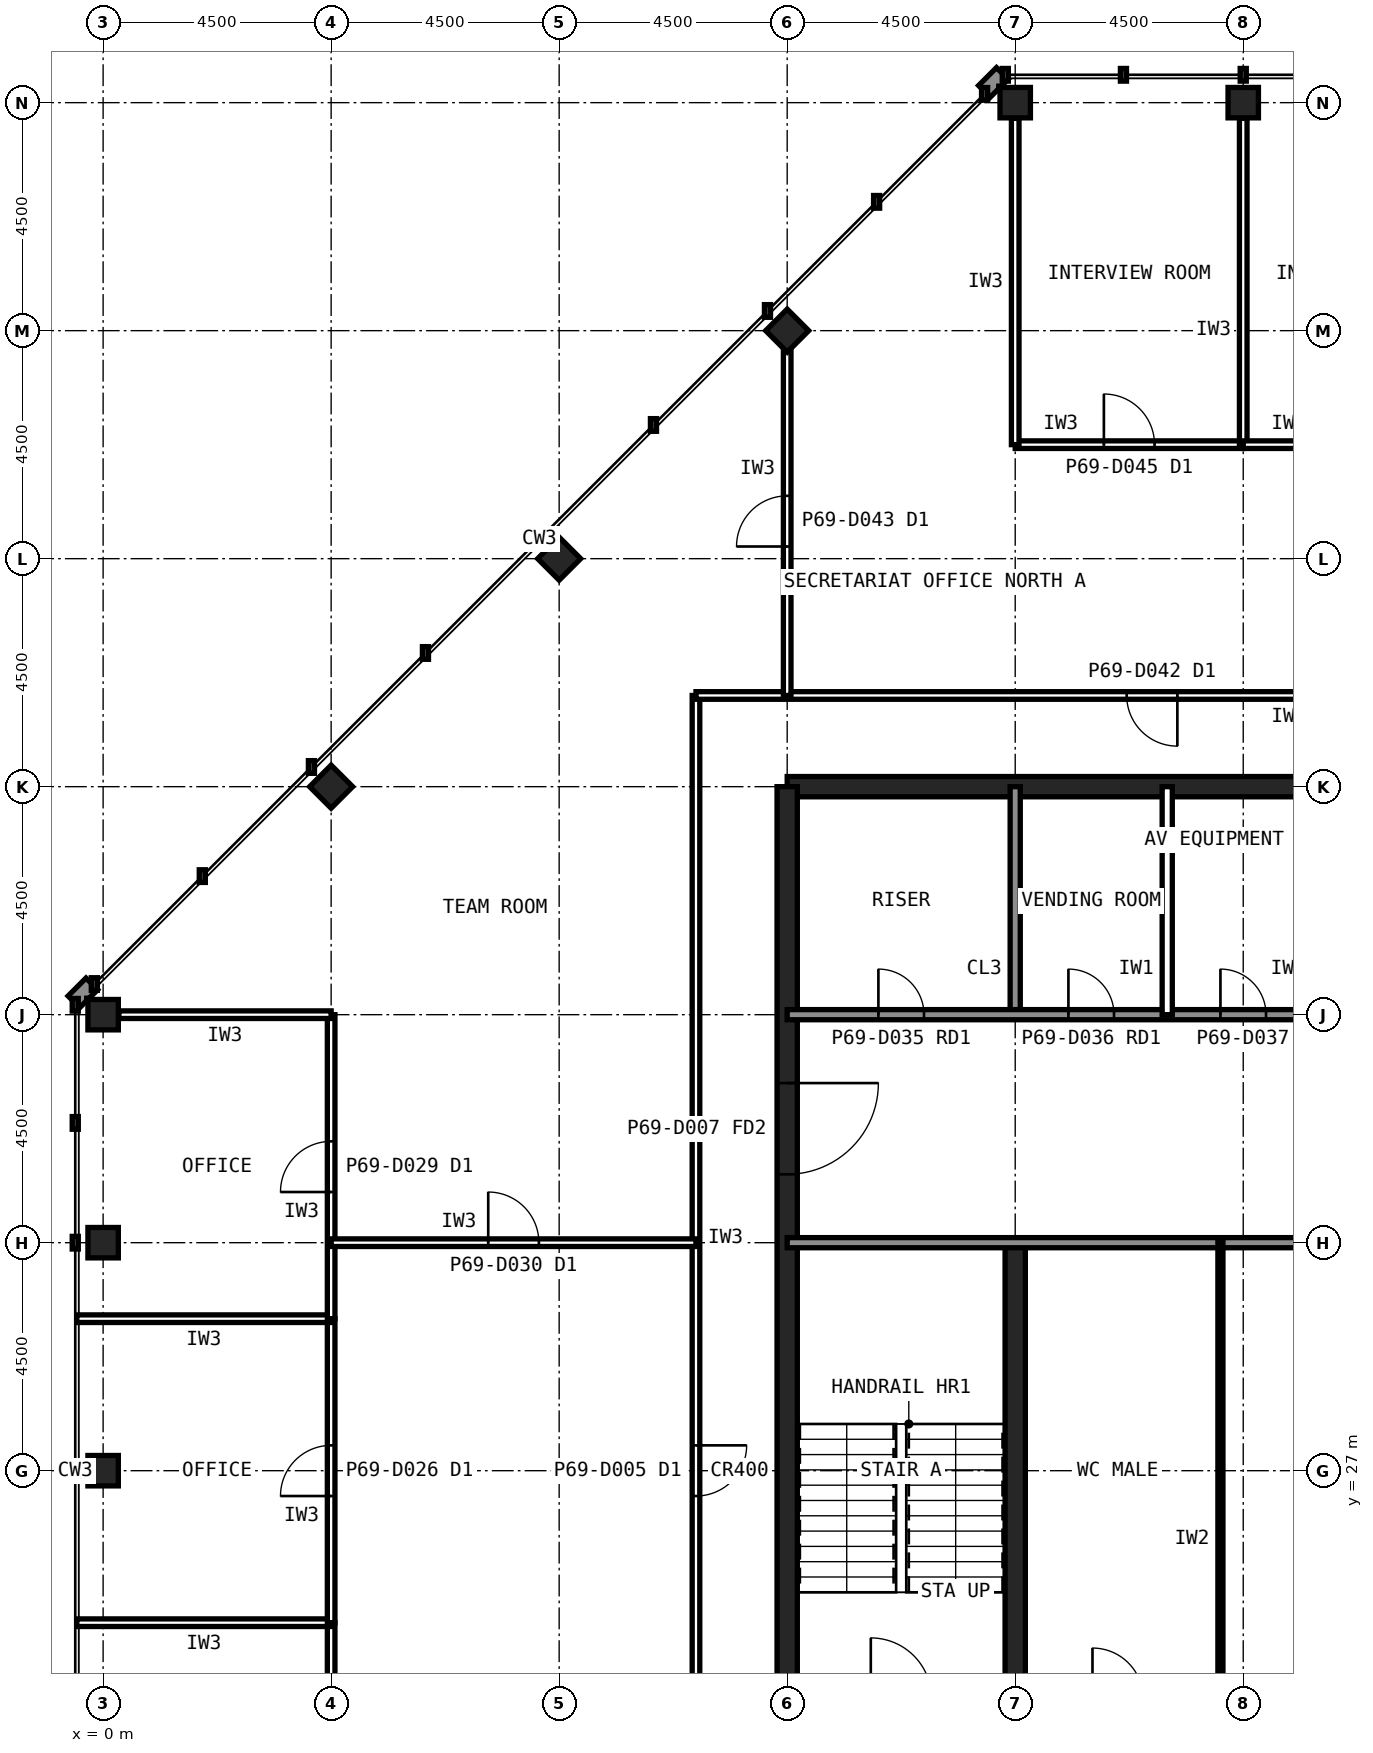
"""IFC4 building model, lengths in metres.
Left out: names, types, materials, properties, quantities, classifications, styles, units other than length and angle.
Written with IfcOpenShell. Run it as: python <this file> out.ifc"""

import sys

from ifc_helpers import new_model, si_unit, direction, frame, frame_2d, origin, origin_2d, place, context, subcontext, project, spatial, rectangle, hollow_rectangle, extrude, element, fill, save


model = new_model("IFC4")
c1 = context("Model", 3, precision=1e-05, world=origin(), true_north=direction((0.0, 1.0)))
c2 = subcontext(c1, "Body", "Model", "MODEL_VIEW")
j1 = project(units=[si_unit("LENGTHUNIT", "METRE"), si_unit("PLANEANGLEUNIT", "RADIAN")], contexts=[c1])
p1 = place(None, origin())
s1 = spatial("IfcSite", under=j1, at=p1, CompositionType="ELEMENT")
p2 = place(p1, origin())
s2 = spatial("IfcBuilding", under=s1, at=p2, CompositionType="ELEMENT")
p3 = place(p2, frame((0.0, 0.0, 286.6)))
s3 = spatial("IfcBuildingStorey", under=s2, at=p3, CompositionType="ELEMENT", Elevation=286.6)
for number, where, z_axis, x_axis in (
    (1, (22.5, 54.0, 0.0), (0.0, 0.0, 1.0), (1.0, 0.0, 0.0)),
    (2, (18.0, 54.0, 0.0), (0.0, 0.0, 1.0), (1.0, 0.0, 0.0)),
    (3, (0.0, 36.0, 0.0), (0.0, 0.0, 1.0), (1.0, 0.0, 0.0)),
    (4, (0.0, 31.5, 0.0), (0.0, 0.0, 1.0), (1.0, 0.0, 0.0)),
    (5, (0.0, 27.0, 0.0), (0.0, 0.0, 1.0), (1.0, 0.0, 0.0)),
    (6, (4.5, 40.5, 0.0), (0.0, 0.0, 1.0), (0.707, 0.707, 0.0)),
    (7, (9.0, 45.0, 0.0), (0.0, 0.0, 1.0), (0.707, 0.707, 0.0)),
    (8, (13.5, 49.5, 0.0), (0.0, 0.0, 1.0), (0.707, 0.707, 0.0)),
):
    element("IfcColumn", number, at=place(p3, frame(where, z_axis=z_axis, x_axis=x_axis)), inside=s3, PredefinedType="COLUMN", context=c2, shape_type="SweptSolid", body=[
        extrude(hollow_rectangle(XDim=0.6, YDim=0.6, WallThickness=0.028, at=origin_2d()), origin(), (0.0, 0.0, 1.0), 4.0),
    ])
p4 = place(p3, frame((40.5, 40.5, 0.0), z_axis=(0.0, 0.0, 1.0), x_axis=(-1.0, 0.0, 0.0)))
e9 = element("IfcWall", 9, at=p4, inside=s3, PredefinedType="SHEAR", context=c2, shape_type="SweptSolid", body=[
    extrude(rectangle(XDim=27.0, YDim=0.4, at=frame_2d((13.5, 0.0))), origin(), (0.0, 0.0, 1.0), 4.0),
])
p5 = place(p3, frame((13.5, 40.5, 0.0), z_axis=(0.0, 0.0, 1.0), x_axis=(0.0, -1.0, 0.0)))
e10 = element("IfcWall", 10, at=p5, inside=s3, PredefinedType="SHEAR", context=c2, shape_type="SweptSolid", body=[
    extrude(rectangle(XDim=27.0, YDim=0.4, at=frame_2d((13.5, 0.0))), origin(), (0.0, 0.0, 1.0), 4.0),
])
p6 = place(p5, frame((19.65, 0.0, 0.0)))
e11 = element("IfcOpeningElement", 11, at=p6, cuts=e10, PredefinedType="OPENING", context=c2, shape_type="SweptSolid", body=[
    extrude(rectangle(XDim=1.2, YDim=2.1, at=frame_2d((0.6, 1.05))), frame((0.0, 0.21, 0.0), z_axis=(0.0, -1.0, 0.0), x_axis=(1.0, 0.0, 0.0)), (0.0, 0.0, 1.0), 0.42),
])
p7 = place(p5, frame((5.85, 0.0, 0.0)))
e12 = element("IfcOpeningElement", 12, at=p7, cuts=e10, PredefinedType="OPENING", context=c2, shape_type="SweptSolid", body=[
    extrude(rectangle(XDim=1.8, YDim=2.1, at=frame_2d((0.9, 1.05))), frame((0.0, 0.21, 0.0), z_axis=(0.0, -1.0, 0.0), x_axis=(1.0, 0.0, 0.0)), (0.0, 0.0, 1.0), 0.42),
])
p8 = place(p3, frame((18.0, 13.5, 0.0), z_axis=(0.0, 0.0, 1.0), x_axis=(0.0, 1.0, 0.0)))
e13 = element("IfcWall", 13, at=p8, inside=s3, PredefinedType="SHEAR", context=c2, shape_type="SweptSolid", body=[
    extrude(rectangle(XDim=18.0, YDim=0.4, at=frame_2d((9.0, 0.0))), origin(), (0.0, 0.0, 1.0), 4.0),
])
p9 = place(p3, frame((18.0, 36.0, 0.0), z_axis=(0.0, 0.0, 1.0), x_axis=(0.0, 1.0, 0.0)))
e14 = element("IfcWall", 14, at=p9, inside=s3, PredefinedType="SOLIDWALL", context=c2, shape_type="SweptSolid", body=[
    extrude(rectangle(XDim=4.5, YDim=0.2, at=frame_2d((2.25, 0.0))), origin(), (0.0, 0.0, 1.0), 3.84),
])
p10 = place(p3, frame((13.5, 36.0, 0.0), z_axis=(0.0, 0.0, 1.0), x_axis=(1.0, 0.0, 0.0)))
e15 = element("IfcWall", 15, at=p10, inside=s3, PredefinedType="SOLIDWALL", context=c2, shape_type="SweptSolid", body=[
    extrude(rectangle(XDim=27.0, YDim=0.2, at=frame_2d((13.5, 0.0))), origin(), (0.0, 0.0, 1.0), 3.84),
])
p11 = place(p10, frame((1.8, 0.0, 0.0)))
e16 = element("IfcOpeningElement", 16, at=p11, cuts=e15, PredefinedType="OPENING", context=c2, shape_type="SweptSolid", body=[
    extrude(rectangle(XDim=0.9, YDim=2.1, at=frame_2d((0.45, 1.05))), frame((0.0, 0.11, 0.0), z_axis=(0.0, -1.0, 0.0), x_axis=(1.0, 0.0, 0.0)), (0.0, 0.0, 1.0), 0.22),
])
p12 = place(p10, frame((5.55, 0.0, 0.0)))
e17 = element("IfcOpeningElement", 17, at=p12, cuts=e15, PredefinedType="OPENING", context=c2, shape_type="SweptSolid", body=[
    extrude(rectangle(XDim=0.9, YDim=2.1, at=frame_2d((0.45, 1.05))), frame((0.0, 0.11, 0.0), z_axis=(0.0, -1.0, 0.0), x_axis=(1.0, 0.0, 0.0)), (0.0, 0.0, 1.0), 0.22),
])
p13 = place(p10, frame((14.55, 0.0, 0.0)))
e18 = element("IfcOpeningElement", 18, at=p13, cuts=e15, PredefinedType="OPENING", context=c2, shape_type="SweptSolid", body=[
    extrude(rectangle(XDim=0.9, YDim=2.1, at=frame_2d((0.45, 1.05))), frame((0.0, 0.11, 0.0), z_axis=(0.0, -1.0, 0.0), x_axis=(1.0, 0.0, 0.0)), (0.0, 0.0, 1.0), 0.22),
])
p14 = place(p10, frame((17.55, 0.0, 0.0)))
e19 = element("IfcOpeningElement", 19, at=p14, cuts=e15, PredefinedType="OPENING", context=c2, shape_type="SweptSolid", body=[
    extrude(rectangle(XDim=0.9, YDim=2.1, at=frame_2d((0.45, 1.05))), frame((0.0, 0.11, 0.0), z_axis=(0.0, -1.0, 0.0), x_axis=(1.0, 0.0, 0.0)), (0.0, 0.0, 1.0), 0.22),
])
p15 = place(p10, frame((24.1, 0.0, 0.0)))
e20 = element("IfcOpeningElement", 20, at=p15, cuts=e15, PredefinedType="OPENING", context=c2, shape_type="SweptSolid", body=[
    extrude(rectangle(XDim=1.3, YDim=2.2, at=frame_2d((0.65, 1.1))), frame((0.0, 0.11, 0.0), z_axis=(0.0, -1.0, 0.0), x_axis=(1.0, 0.0, 0.0)), (0.0, 0.0, 1.0), 0.22),
])
p16 = place(p3, frame((13.5, 31.5, 0.0), z_axis=(0.0, 0.0, 1.0), x_axis=(1.0, 0.0, 0.0)))
e21 = element("IfcWall", 21, at=p16, inside=s3, PredefinedType="SOLIDWALL", context=c2, shape_type="SweptSolid", body=[
    extrude(rectangle(XDim=27.0, YDim=0.2, at=frame_2d((13.5, 0.0))), origin(), (0.0, 0.0, 1.0), 3.84),
])
p17 = place(p16, frame((24.15, 0.0, 0.0)))
e22 = element("IfcOpeningElement", 22, at=p17, cuts=e21, PredefinedType="OPENING", context=c2, shape_type="SweptSolid", body=[
    extrude(rectangle(XDim=1.2, YDim=2.1, at=frame_2d((0.6, 1.05))), frame((0.0, 0.11, 0.0), z_axis=(0.0, -1.0, 0.0), x_axis=(1.0, 0.0, 0.0)), (0.0, 0.0, 1.0), 0.22),
])
p18 = place(p16, frame((15.3, 0.0, 0.0)))
e23 = element("IfcOpeningElement", 23, at=p18, cuts=e21, PredefinedType="OPENING", context=c2, shape_type="SweptSolid", body=[
    extrude(rectangle(XDim=0.9, YDim=2.1, at=frame_2d((0.45, 1.05))), frame((0.0, 0.11, 0.0), z_axis=(0.0, -1.0, 0.0), x_axis=(1.0, 0.0, 0.0)), (0.0, 0.0, 1.0), 0.22),
])
p19 = place(p16, frame((19.8, 0.0, 0.0)))
e24 = element("IfcOpeningElement", 24, at=p19, cuts=e21, PredefinedType="OPENING", context=c2, shape_type="SweptSolid", body=[
    extrude(rectangle(XDim=0.9, YDim=2.1, at=frame_2d((0.45, 1.05))), frame((0.0, 0.11, 0.0), z_axis=(0.0, -1.0, 0.0), x_axis=(1.0, 0.0, 0.0)), (0.0, 0.0, 1.0), 0.22),
])
p20 = place(p3, frame((22.05, 22.5, 0.0), z_axis=(0.0, 0.0, 1.0), x_axis=(0.0, 1.0, 0.0)))
e25 = element("IfcWall", 25, at=p20, inside=s3, PredefinedType="PLUMBINGWALL", context=c2, shape_type="SweptSolid", body=[
    extrude(rectangle(XDim=9.0, YDim=0.1, at=frame_2d((4.5, 0.0))), origin(), (0.0, 0.0, 1.0), 3.84),
])
p21 = place(p3, frame((11.7, 42.3, 0.0), z_axis=(0.0, 0.0, 1.0), x_axis=(0.0, -1.0, 0.0)))
e26 = element("IfcWall", 26, at=p21, inside=s3, PredefinedType="PARTITIONING", context=c2, shape_type="SweptSolid", body=[
    extrude(rectangle(XDim=30.6, YDim=0.15, at=frame_2d((15.3, 0.0))), origin(), (0.0, 0.0, 1.0), 3.84),
])
p22 = place(p21, frame((14.8, 0.0, 0.0)))
e27 = element("IfcOpeningElement", 27, at=p22, cuts=e26, PredefinedType="OPENING", context=c2, shape_type="SweptSolid", body=[
    extrude(rectangle(XDim=1.0, YDim=2.1, at=frame_2d((0.5, 1.05))), frame((0.0, 0.085, 0.0), z_axis=(0.0, -1.0, 0.0), x_axis=(1.0, 0.0, 0.0)), (0.0, 0.0, 1.0), 0.17),
])
p23 = place(p3, frame((29.7, 42.3, 0.0), z_axis=(0.0, 0.0, 1.0), x_axis=(-1.0, 0.0, 0.0)))
e28 = element("IfcWall", 28, at=p23, inside=s3, PredefinedType="PARTITIONING", context=c2, shape_type="SweptSolid", body=[
    extrude(rectangle(XDim=18.0, YDim=0.15, at=frame_2d((9.0, 0.0))), origin(), (0.0, 0.0, 1.0), 3.84),
])
p24 = place(p23, frame((8.5, 0.0, 0.0)))
e29 = element("IfcOpeningElement", 29, at=p24, cuts=e28, PredefinedType="OPENING", context=c2, shape_type="SweptSolid", body=[
    extrude(rectangle(XDim=1.0, YDim=2.1, at=frame_2d((0.5, 1.05))), frame((0.0, 0.085, 0.0), z_axis=(0.0, -1.0, 0.0), x_axis=(1.0, 0.0, 0.0)), (0.0, 0.0, 1.0), 0.17),
])
p25 = place(p3, frame((4.5, 18.0, 0.0), z_axis=(0.0, 0.0, 1.0), x_axis=(0.0, 1.0, 0.0)))
e30 = element("IfcWall", 30, at=p25, inside=s3, PredefinedType="PARTITIONING", context=c2, shape_type="SweptSolid", body=[
    extrude(rectangle(XDim=6.0, YDim=0.15, at=frame_2d((3.0, 0.0))), origin(), (0.0, 0.0, 1.0), 3.84),
])
p26 = place(p25, frame((2.5, 0.0, 0.0)))
e31 = element("IfcOpeningElement", 31, at=p26, cuts=e30, PredefinedType="OPENING", context=c2, shape_type="SweptSolid", body=[
    extrude(rectangle(XDim=1.0, YDim=2.1, at=frame_2d((0.5, 1.05))), frame((0.0, 0.085, 0.0), z_axis=(0.0, -1.0, 0.0), x_axis=(1.0, 0.0, 0.0)), (0.0, 0.0, 1.0), 0.17),
])
p27 = place(p3, frame((4.5, 24.0, 0.0), z_axis=(0.0, 0.0, 1.0), x_axis=(-1.0, 0.0, 0.0)))
e32 = element("IfcWall", 32, at=p27, inside=s3, PredefinedType="PARTITIONING", context=c2, shape_type="SweptSolid", body=[
    extrude(rectangle(XDim=5.02, YDim=0.15, at=frame_2d((2.51, 0.0))), origin(), (0.0, 0.0, 1.0), 3.84),
])
p28 = place(p3, frame((4.5, 24.0, 0.0), z_axis=(0.0, 0.0, 1.0), x_axis=(0.0, 1.0, 0.0)))
e33 = element("IfcWall", 33, at=p28, inside=s3, PredefinedType="PARTITIONING", context=c2, shape_type="SweptSolid", body=[
    extrude(rectangle(XDim=6.0, YDim=0.15, at=frame_2d((3.0, 0.0))), origin(), (0.0, 0.0, 1.0), 3.84),
])
p29 = place(p28, frame((2.5, 0.0, 0.0)))
e34 = element("IfcOpeningElement", 34, at=p29, cuts=e33, PredefinedType="OPENING", context=c2, shape_type="SweptSolid", body=[
    extrude(rectangle(XDim=1.0, YDim=2.1, at=frame_2d((0.5, 1.05))), frame((0.0, 0.085, 0.0), z_axis=(0.0, -1.0, 0.0), x_axis=(1.0, 0.0, 0.0)), (0.0, 0.0, 1.0), 0.17),
])
p30 = place(p3, frame((4.5, 30.0, 0.0), z_axis=(0.0, 0.0, 1.0), x_axis=(-1.0, 0.0, 0.0)))
e35 = element("IfcWall", 35, at=p30, inside=s3, PredefinedType="PARTITIONING", context=c2, shape_type="SweptSolid", body=[
    extrude(rectangle(XDim=5.02, YDim=0.15, at=frame_2d((2.51, 0.0))), origin(), (0.0, 0.0, 1.0), 3.84),
])
p31 = place(p3, frame((4.5, 30.0, 0.0), z_axis=(0.0, 0.0, 1.0), x_axis=(0.0, 1.0, 0.0)))
e36 = element("IfcWall", 36, at=p31, inside=s3, PredefinedType="PARTITIONING", context=c2, shape_type="SweptSolid", body=[
    extrude(rectangle(XDim=6.0, YDim=0.15, at=frame_2d((3.0, 0.0))), origin(), (0.0, 0.0, 1.0), 3.84),
])
p32 = place(p31, frame((2.5, 0.0, 0.0)))
e37 = element("IfcOpeningElement", 37, at=p32, cuts=e36, PredefinedType="OPENING", context=c2, shape_type="SweptSolid", body=[
    extrude(rectangle(XDim=1.0, YDim=2.1, at=frame_2d((0.5, 1.05))), frame((0.0, 0.085, 0.0), z_axis=(0.0, -1.0, 0.0), x_axis=(1.0, 0.0, 0.0)), (0.0, 0.0, 1.0), 0.17),
])
p33 = place(p3, frame((4.5, 36.0, 0.0), z_axis=(0.0, 0.0, 1.0), x_axis=(-1.0, 0.0, 0.0)))
e38 = element("IfcWall", 38, at=p33, inside=s3, PredefinedType="PARTITIONING", context=c2, shape_type="SweptSolid", body=[
    extrude(rectangle(XDim=4.19, YDim=0.15, at=frame_2d((2.095, 0.0))), origin(), (0.0, 0.0, 1.0), 2.989),
])
p34 = place(p3, frame((18.0, 47.25, 0.0), z_axis=(0.0, 0.0, 1.0), x_axis=(1.0, 0.0, 0.0)))
e39 = element("IfcWall", 39, at=p34, inside=s3, PredefinedType="PARTITIONING", context=c2, shape_type="SweptSolid", body=[
    extrude(rectangle(XDim=4.5, YDim=0.15, at=frame_2d((2.25, 0.0))), origin(), (0.0, 0.0, 1.0), 3.84),
])
p35 = place(p34, frame((1.75, 0.0, 0.0)))
e40 = element("IfcOpeningElement", 40, at=p35, cuts=e39, PredefinedType="OPENING", context=c2, shape_type="SweptSolid", body=[
    extrude(rectangle(XDim=1.0, YDim=2.1, at=frame_2d((0.5, 1.05))), frame((0.0, 0.085, 0.0), z_axis=(0.0, -1.0, 0.0), x_axis=(1.0, 0.0, 0.0)), (0.0, 0.0, 1.0), 0.17),
])
for number, where, z_axis, x_axis in (
    (41, (22.5, 47.25, 0.0), (0.0, 0.0, 1.0), (0.0, 1.0, 0.0)),
    (42, (18.0, 53.69, 0.0), (0.0, 0.0, 1.0), (0.0, -1.0, 0.0)),
):
    element("IfcWall", number, at=place(p3, frame(where, z_axis=z_axis, x_axis=x_axis)), inside=s3, PredefinedType="PARTITIONING", context=c2, shape_type="SweptSolid", body=[
        extrude(rectangle(XDim=6.44, YDim=0.15, at=frame_2d((3.22, 0.0))), origin(), (0.0, 0.0, 1.0), 2.989),
    ])
p36 = place(p3, frame((22.5, 47.25, 0.0), z_axis=(0.0, 0.0, 1.0), x_axis=(1.0, 0.0, 0.0)))
e43 = element("IfcWall", 43, at=p36, inside=s3, PredefinedType="PARTITIONING", context=c2, shape_type="SweptSolid", body=[
    extrude(rectangle(XDim=4.5, YDim=0.15, at=frame_2d((2.25, 0.0))), origin(), (0.0, 0.0, 1.0), 3.84),
])
p37 = place(p36, frame((1.75, 0.0, 0.0)))
e44 = element("IfcOpeningElement", 44, at=p37, cuts=e43, PredefinedType="OPENING", context=c2, shape_type="SweptSolid", body=[
    extrude(rectangle(XDim=1.0, YDim=2.1, at=frame_2d((0.5, 1.05))), frame((0.0, 0.085, 0.0), z_axis=(0.0, -1.0, 0.0), x_axis=(1.0, 0.0, 0.0)), (0.0, 0.0, 1.0), 0.17),
])
p38 = place(p3, frame((13.5, 42.3, 0.0), z_axis=(0.0, 0.0, 1.0), x_axis=(0.0, 1.0, 0.0)))
e45 = element("IfcWall", 45, at=p38, inside=s3, PredefinedType="PARTITIONING", context=c2, shape_type="SweptSolid", body=[
    extrude(rectangle(XDim=6.88, YDim=0.15, at=frame_2d((3.44, 0.0))), origin(), (0.0, 0.0, 1.0), 2.989),
])
p39 = place(p38, frame((2.94, 0.0, 0.0)))
e46 = element("IfcOpeningElement", 46, at=p39, cuts=e45, PredefinedType="OPENING", context=c2, shape_type="SweptSolid", body=[
    extrude(rectangle(XDim=1.0, YDim=2.1, at=frame_2d((0.5, 1.05))), frame((0.0, 0.085, 0.0), z_axis=(0.0, -1.0, 0.0), x_axis=(1.0, 0.0, 0.0)), (0.0, 0.0, 1.0), 0.17),
])
p40 = place(p3, frame((4.5, 31.5, 0.0), z_axis=(0.0, 0.0, 1.0), x_axis=(1.0, 0.0, 0.0)))
e47 = element("IfcWall", 47, at=p40, inside=s3, PredefinedType="PARTITIONING", context=c2, shape_type="SweptSolid", body=[
    extrude(rectangle(XDim=7.2, YDim=0.15, at=frame_2d((3.6, 0.0))), origin(), (0.0, 0.0, 1.0), 2.989),
])
p41 = place(p40, frame((3.1, 0.0, 0.0)))
e48 = element("IfcOpeningElement", 48, at=p41, cuts=e47, PredefinedType="OPENING", context=c2, shape_type="SweptSolid", body=[
    extrude(rectangle(XDim=1.0, YDim=2.1, at=frame_2d((0.5, 1.05))), frame((0.0, 0.085, 0.0), z_axis=(0.0, -1.0, 0.0), x_axis=(1.0, 0.0, 0.0)), (0.0, 0.0, 1.0), 0.17),
])
p42 = place(p7, origin())
e49 = element("IfcDoor", 49, at=p42, inside=s3, OperationType="SINGLE_SWING_LEFT", PredefinedType="DOOR", context=c2, shape_type="SweptSolid", body=[
    extrude(rectangle(XDim=1.8, YDim=2.1, at=frame_2d((0.9, 1.05))), frame((0.0, 0.025, 0.0), z_axis=(0.0, -1.0, 0.0), x_axis=(1.0, 0.0, 0.0)), (0.0, 0.0, 1.0), 0.05),
])
fill(e12, e49)
p43 = place(p11, origin())
e50 = element("IfcDoor", 50, at=p43, inside=s3, OperationType="SINGLE_SWING_LEFT", PredefinedType="DOOR", context=c2, shape_type="SweptSolid", body=[
    extrude(rectangle(XDim=0.9, YDim=2.1, at=frame_2d((0.45, 1.05))), frame((0.0, 0.025, 0.0), z_axis=(0.0, -1.0, 0.0), x_axis=(1.0, 0.0, 0.0)), (0.0, 0.0, 1.0), 0.05),
])
fill(e16, e50)
p44 = place(p12, origin())
e51 = element("IfcDoor", 51, at=p44, inside=s3, OperationType="SINGLE_SWING_LEFT", PredefinedType="DOOR", context=c2, shape_type="SweptSolid", body=[
    extrude(rectangle(XDim=0.9, YDim=2.1, at=frame_2d((0.45, 1.05))), frame((0.0, 0.025, 0.0), z_axis=(0.0, -1.0, 0.0), x_axis=(1.0, 0.0, 0.0)), (0.0, 0.0, 1.0), 0.05),
])
fill(e17, e51)
p45 = place(p24, origin())
e52 = element("IfcDoor", 52, at=p45, inside=s3, OperationType="SINGLE_SWING_LEFT", PredefinedType="DOOR", context=c2, shape_type="SweptSolid", body=[
    extrude(rectangle(XDim=1.0, YDim=2.1, at=frame_2d((0.5, 1.05))), frame((0.0, 0.025, 0.0), z_axis=(0.0, -1.0, 0.0), x_axis=(1.0, 0.0, 0.0)), (0.0, 0.0, 1.0), 0.05),
])
fill(e29, e52)
p46 = place(p22, origin())
e53 = element("IfcDoor", 53, at=p46, inside=s3, OperationType="SINGLE_SWING_LEFT", PredefinedType="DOOR", context=c2, shape_type="SweptSolid", body=[
    extrude(rectangle(XDim=1.0, YDim=2.1, at=frame_2d((0.5, 1.05))), frame((0.0, 0.025, 0.0), z_axis=(0.0, -1.0, 0.0), x_axis=(1.0, 0.0, 0.0)), (0.0, 0.0, 1.0), 0.05),
])
fill(e27, e53)
p47 = place(p29, origin())
e54 = element("IfcDoor", 54, at=p47, inside=s3, OperationType="SINGLE_SWING_LEFT", PredefinedType="DOOR", context=c2, shape_type="SweptSolid", body=[
    extrude(rectangle(XDim=1.0, YDim=2.1, at=frame_2d((0.5, 1.05))), frame((0.0, 0.025, 0.0), z_axis=(0.0, -1.0, 0.0), x_axis=(1.0, 0.0, 0.0)), (0.0, 0.0, 1.0), 0.05),
])
fill(e34, e54)
p48 = place(p32, origin())
e55 = element("IfcDoor", 55, at=p48, inside=s3, OperationType="SINGLE_SWING_LEFT", PredefinedType="DOOR", context=c2, shape_type="SweptSolid", body=[
    extrude(rectangle(XDim=1.0, YDim=2.1, at=frame_2d((0.5, 1.05))), frame((0.0, 0.025, 0.0), z_axis=(0.0, -1.0, 0.0), x_axis=(1.0, 0.0, 0.0)), (0.0, 0.0, 1.0), 0.05),
])
fill(e37, e55)
p49 = place(p35, origin())
e56 = element("IfcDoor", 56, at=p49, inside=s3, OperationType="SINGLE_SWING_LEFT", PredefinedType="DOOR", context=c2, shape_type="SweptSolid", body=[
    extrude(rectangle(XDim=1.0, YDim=2.1, at=frame_2d((0.5, 1.05))), frame((0.0, 0.025, 0.0), z_axis=(0.0, -1.0, 0.0), x_axis=(1.0, 0.0, 0.0)), (0.0, 0.0, 1.0), 0.05),
])
fill(e40, e56)
p50 = place(p39, origin())
e57 = element("IfcDoor", 57, at=p50, inside=s3, OperationType="SINGLE_SWING_LEFT", PredefinedType="DOOR", context=c2, shape_type="SweptSolid", body=[
    extrude(rectangle(XDim=1.0, YDim=2.1, at=frame_2d((0.5, 1.05))), frame((0.0, 0.025, 0.0), z_axis=(0.0, -1.0, 0.0), x_axis=(1.0, 0.0, 0.0)), (0.0, 0.0, 1.0), 0.05),
])
fill(e46, e57)
p51 = place(p41, origin())
e58 = element("IfcDoor", 58, at=p51, inside=s3, OperationType="SINGLE_SWING_LEFT", PredefinedType="DOOR", context=c2, shape_type="SweptSolid", body=[
    extrude(rectangle(XDim=1.0, YDim=2.1, at=frame_2d((0.5, 1.05))), frame((0.0, 0.025, 0.0), z_axis=(0.0, -1.0, 0.0), x_axis=(1.0, 0.0, 0.0)), (0.0, 0.0, 1.0), 0.05),
])
fill(e48, e58)
save(model, sys.argv[1])
